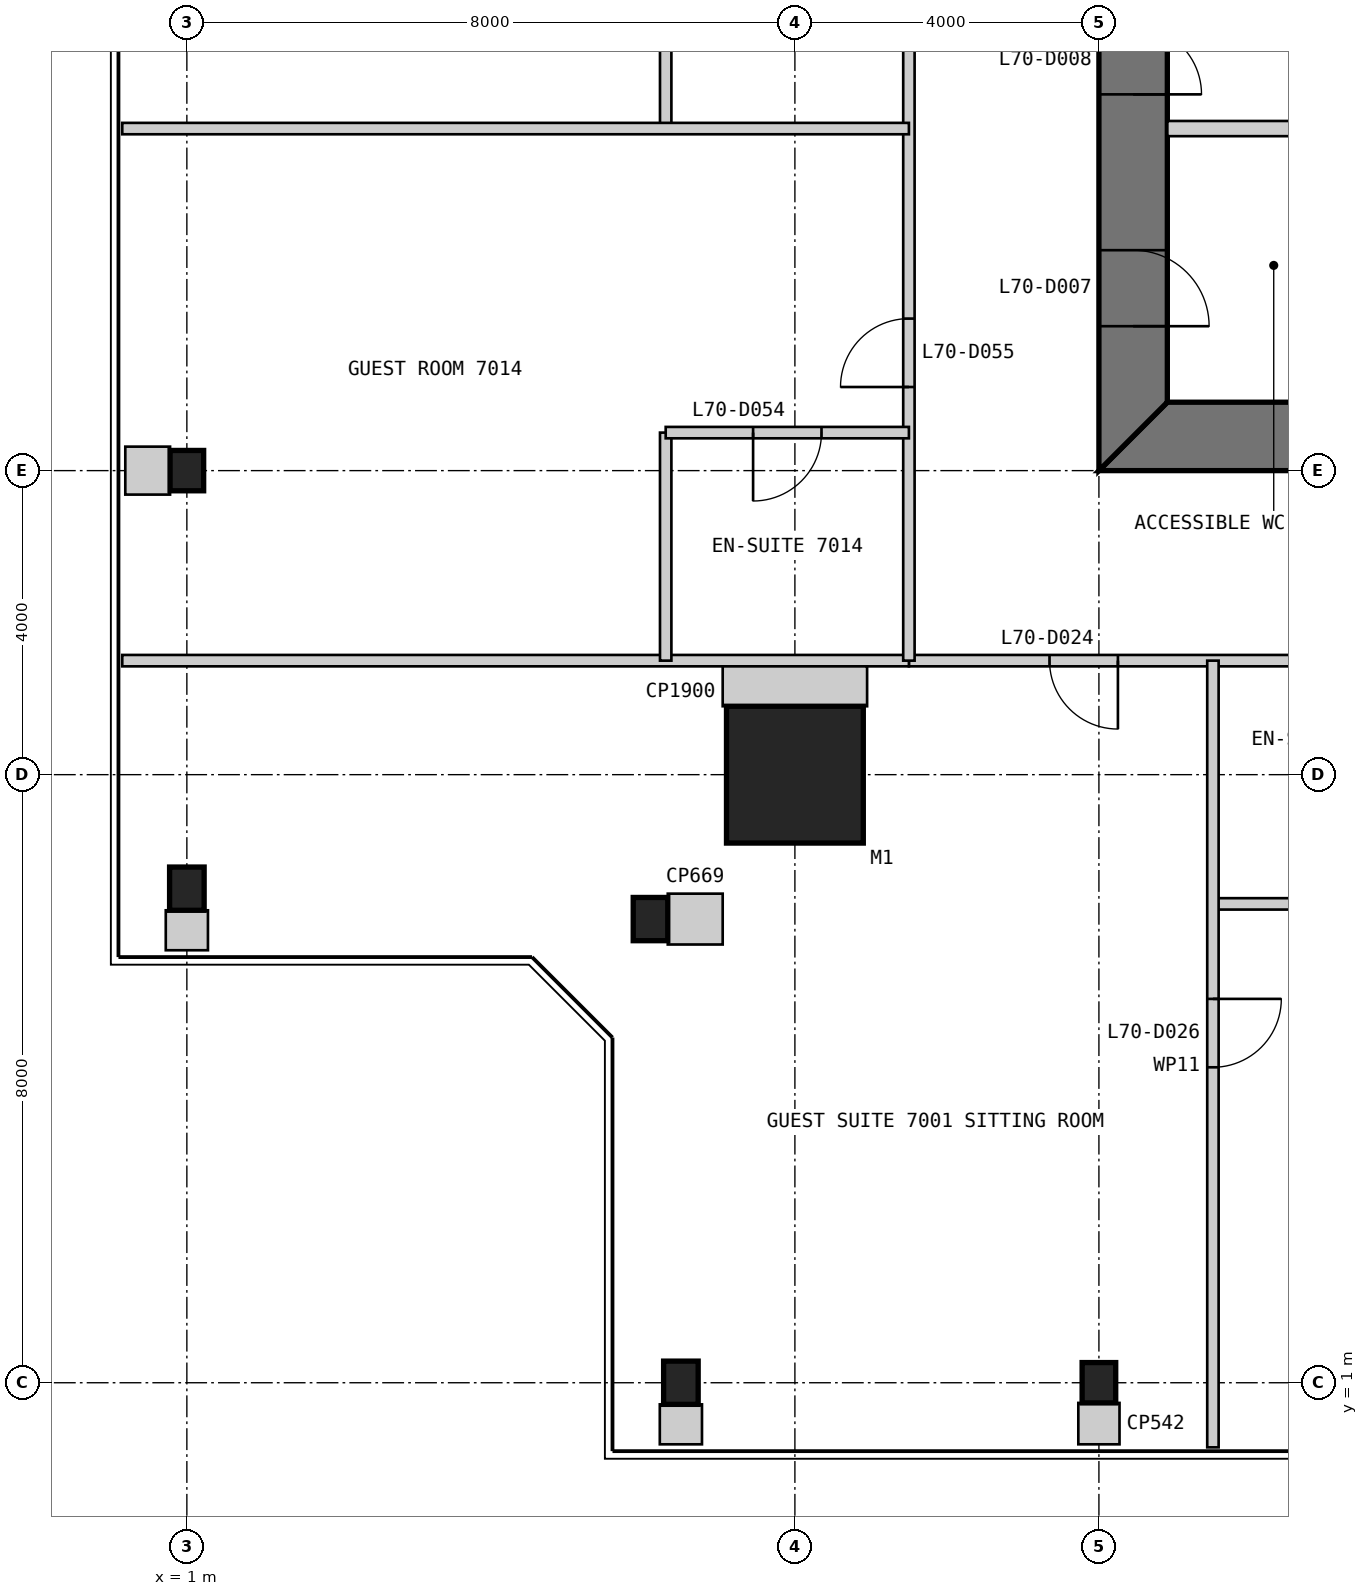
"""IFC4 building model, lengths in metres.
Left out: names, types, materials, properties, quantities, classifications, styles, units other than length and angle.
Written with IfcOpenShell. Run it as: python <this file> out.ifc"""

import sys

from ifc_helpers import new_model, si_unit, direction, frame, frame_2d, origin, origin_2d, place, context, subcontext, project, spatial, polyline, rectangle, i_section, outline, extrude, element, fill, save


model = new_model("IFC4")
c1 = context("Model", 3, precision=1e-05, world=origin(), true_north=direction((0.0, 1.0)))
c2 = subcontext(c1, "Body", "Model", "MODEL_VIEW")
j1 = project(units=[si_unit("LENGTHUNIT", "METRE"), si_unit("PLANEANGLEUNIT", "RADIAN")], contexts=[c1])
p1 = place(None, origin())
s1 = spatial("IfcSite", under=j1, at=p1, CompositionType="ELEMENT")
p2 = place(p1, origin())
s2 = spatial("IfcBuilding", under=s1, at=p2, CompositionType="ELEMENT")
p3 = place(p2, frame((0.0, 0.0, 290.0)))
s3 = spatial("IfcBuildingStorey", under=s2, at=p3, CompositionType="ELEMENT", Elevation=290.0)
p4 = place(p3, frame((9.0, 9.0, 0.0), z_axis=(0.0, 0.0, 1.0), x_axis=(1.0, 0.0, 0.0)))
e1 = element("IfcColumn", 1, at=p4, inside=s3, PredefinedType="COLUMN", context=c2, shape_type="SweptSolid", body=[
    extrude(rectangle(XDim=1.8, YDim=1.8, at=origin_2d()), origin(), (0.0, 0.0, 1.0), 3.4),
])
p5 = place(p3, frame((7.5, 1.0, 0.0), z_axis=(0.0, 0.0, 1.0), x_axis=(1.0, 0.0, 0.0)))
e2 = element("IfcColumn", 2, at=p5, inside=s3, PredefinedType="COLUMN", context=c2, shape_type="SweptSolid", body=[
    extrude(i_section(OverallWidth=0.455, OverallDepth=0.569, WebThickness=0.078, FlangeThickness=0.125, at=origin_2d()), origin(), (0.0, 0.0, 1.0), 3.4),
])
for number, where, z_axis, x_axis in (
    (3, (13.0, 1.0, 0.0), (0.0, 0.0, 1.0), (1.0, 0.0, 0.0)),
    (4, (1.0, 13.0, 0.0), (0.0, 0.0, 1.0), (1.0, 0.0, 0.0)),
):
    element("IfcColumn", number, at=place(p3, frame(where, z_axis=z_axis, x_axis=x_axis)), inside=s3, PredefinedType="COLUMN", context=c2, shape_type="SweptSolid", body=[
        extrude(i_section(OverallWidth=0.442, OverallDepth=0.531, WebThickness=0.066, FlangeThickness=0.106, at=origin_2d()), origin(), (0.0, 0.0, 1.0), 3.4),
    ])
for number, where, z_axis, x_axis in (
    (5, (1.0, 7.5, 0.0), (0.0, 0.0, 1.0), (1.0, 0.0, 0.0)),
    (6, (7.1, 7.1, 0.0), (0.0, 0.0, 1.0), (1.0, 0.0, 0.0)),
):
    element("IfcColumn", number, at=place(p3, frame(where, z_axis=z_axis, x_axis=x_axis)), inside=s3, PredefinedType="COLUMN", context=c2, shape_type="SweptSolid", body=[
        extrude(i_section(OverallWidth=0.455, OverallDepth=0.569, WebThickness=0.078, FlangeThickness=0.125, at=origin_2d()), origin(), (0.0, 0.0, 1.0), 3.4),
    ])
p6 = place(p3, frame((13.0, 13.45, 0.0), z_axis=(0.0, 0.0, 1.0), x_axis=(1.0, 0.0, 0.0)))
e7 = element("IfcWall", 7, at=p6, inside=s3, PredefinedType="SHEAR", context=c2, shape_type="SweptSolid", body=[
    extrude(outline(polyline([(0.0, -0.45), (24.0, -0.45), (23.1, 0.45), (0.9, 0.45), (0.0, -0.45)])), origin(), (0.0, 0.0, 1.0), 3.4),
])
p7 = place(p6, frame((4.9, 0.0, 0.0)))
e8 = element("IfcOpeningElement", 8, at=p7, cuts=e7, PredefinedType="OPENING", context=c2, shape_type="SweptSolid", body=[
    extrude(rectangle(XDim=1.0, YDim=2.2, at=frame_2d((0.5, 1.1))), frame((0.0, 0.46, 0.0), z_axis=(0.0, -1.0, 0.0), x_axis=(1.0, 0.0, 0.0)), (0.0, 0.0, 1.0), 0.92),
])
p8 = place(p6, frame((8.9, 0.0, 0.0)))
e9 = element("IfcOpeningElement", 9, at=p8, cuts=e7, PredefinedType="OPENING", context=c2, shape_type="SweptSolid", body=[
    extrude(rectangle(XDim=1.1, YDim=2.2, at=frame_2d((0.55, 1.1))), frame((0.0, 0.46, 0.0), z_axis=(0.0, -1.0, 0.0), x_axis=(1.0, 0.0, 0.0)), (0.0, 0.0, 1.0), 0.92),
])
p9 = place(p6, frame((15.05, 0.0, 0.0)))
e10 = element("IfcOpeningElement", 10, at=p9, cuts=e7, PredefinedType="OPENING", context=c2, shape_type="SweptSolid", body=[
    extrude(rectangle(XDim=0.9, YDim=2.2, at=frame_2d((0.45, 1.1))), frame((0.0, 0.46, 0.0), z_axis=(0.0, -1.0, 0.0), x_axis=(1.0, 0.0, 0.0)), (0.0, 0.0, 1.0), 0.92),
])
p10 = place(p6, frame((17.9, 0.0, 0.0)))
e11 = element("IfcOpeningElement", 11, at=p10, cuts=e7, PredefinedType="OPENING", context=c2, shape_type="SweptSolid", body=[
    extrude(rectangle(XDim=1.0, YDim=2.2, at=frame_2d((0.5, 1.1))), frame((0.0, 0.46, 0.0), z_axis=(0.0, -1.0, 0.0), x_axis=(1.0, 0.0, 0.0)), (0.0, 0.0, 1.0), 0.92),
])
p11 = place(p6, frame((21.4, 0.0, 0.0)))
e12 = element("IfcOpeningElement", 12, at=p11, cuts=e7, PredefinedType="OPENING", context=c2, shape_type="SweptSolid", body=[
    extrude(rectangle(XDim=1.0, YDim=2.2, at=frame_2d((0.5, 1.1))), frame((0.0, 0.46, 0.0), z_axis=(0.0, -1.0, 0.0), x_axis=(1.0, 0.0, 0.0)), (0.0, 0.0, 1.0), 0.92),
])
p12 = place(p3, frame((13.45, 36.1, 0.0), z_axis=(0.0, 0.0, 1.0), x_axis=(0.0, -1.0, 0.0)))
e13 = element("IfcWall", 13, at=p12, inside=s3, PredefinedType="SHEAR", context=c2, shape_type="SweptSolid", body=[
    extrude(outline(polyline([(-0.9, -0.45), (23.1, -0.45), (22.2, 0.45), (0.0, 0.45), (-0.9, -0.45)])), origin(), (0.0, 0.0, 1.0), 3.4),
])
p13 = place(p12, frame((20.2, 0.0, 0.0)))
e14 = element("IfcOpeningElement", 14, at=p13, cuts=e13, PredefinedType="OPENING", context=c2, shape_type="SweptSolid", body=[
    extrude(rectangle(XDim=1.0, YDim=2.2, at=frame_2d((0.5, 1.1))), frame((0.0, 0.46, 0.0), z_axis=(0.0, -1.0, 0.0), x_axis=(1.0, 0.0, 0.0)), (0.0, 0.0, 1.0), 0.92),
])
p14 = place(p12, frame((17.25, 0.0, 0.0)))
e15 = element("IfcOpeningElement", 15, at=p14, cuts=e13, PredefinedType="OPENING", context=c2, shape_type="SweptSolid", body=[
    extrude(rectangle(XDim=0.9, YDim=2.2, at=frame_2d((0.45, 1.1))), frame((0.0, 0.46, 0.0), z_axis=(0.0, -1.0, 0.0), x_axis=(1.0, 0.0, 0.0)), (0.0, 0.0, 1.0), 0.92),
])
p15 = place(p3, frame((13.9, 17.5, 0.0), z_axis=(0.0, 0.0, 1.0), x_axis=(1.0, 0.0, 0.0)))
e16 = element("IfcWall", 16, at=p15, inside=s3, PredefinedType="PARTITIONING", context=c2, shape_type="SweptSolid", body=[
    extrude(rectangle(XDim=2.8, YDim=0.2, at=frame_2d((1.4, 0.0))), origin(), (0.0, 0.0, 1.0), 3.2),
])
p16 = place(p3, frame((10.5, 10.5, 0.0), z_axis=(0.0, 0.0, 1.0), x_axis=(1.0, 0.0, 0.0)))
e17 = element("IfcWall", 17, at=p16, inside=s3, PredefinedType="PARTITIONING", context=c2, shape_type="SweptSolid", body=[
    extrude(rectangle(XDim=29.0, YDim=0.15, at=frame_2d((14.5, 0.0))), origin(), (0.0, 0.0, 1.0), 3.25),
])
p17 = place(p16, frame((1.85, 0.0, 0.0)))
e18 = element("IfcOpeningElement", 18, at=p17, cuts=e17, PredefinedType="OPENING", context=c2, shape_type="SweptSolid", body=[
    extrude(rectangle(XDim=0.9, YDim=2.1, at=frame_2d((0.45, 1.05))), frame((0.0, 0.085, 0.0), z_axis=(0.0, -1.0, 0.0), x_axis=(1.0, 0.0, 0.0)), (0.0, 0.0, 1.0), 0.17),
])
p18 = place(p16, frame((11.5, 0.0, 0.0)))
e19 = element("IfcOpeningElement", 19, at=p18, cuts=e17, PredefinedType="OPENING", context=c2, shape_type="SweptSolid", body=[
    extrude(rectangle(XDim=0.9, YDim=2.1, at=frame_2d((0.45, 1.05))), frame((0.0, 0.085, 0.0), z_axis=(0.0, -1.0, 0.0), x_axis=(1.0, 0.0, 0.0)), (0.0, 0.0, 1.0), 0.17),
])
p19 = place(p16, frame((24.1, 0.0, 0.0)))
e20 = element("IfcOpeningElement", 20, at=p19, cuts=e17, PredefinedType="OPENING", context=c2, shape_type="SweptSolid", body=[
    extrude(rectangle(XDim=0.9, YDim=2.1, at=frame_2d((0.45, 1.05))), frame((0.0, 0.085, 0.0), z_axis=(0.0, -1.0, 0.0), x_axis=(1.0, 0.0, 0.0)), (0.0, 0.0, 1.0), 0.17),
])
p20 = place(p3, frame((0.15, 10.5, 0.0), z_axis=(0.0, 0.0, 1.0), x_axis=(1.0, 0.0, 0.0)))
e21 = element("IfcWall", 21, at=p20, inside=s3, PredefinedType="PARTITIONING", context=c2, shape_type="SweptSolid", body=[
    extrude(rectangle(XDim=10.35, YDim=0.15, at=frame_2d((5.175, 0.0))), origin(), (0.0, 0.0, 1.0), 3.25),
])
p21 = place(p3, frame((14.5, 7.3, 0.0), z_axis=(0.0, 0.0, 1.0), x_axis=(1.0, 0.0, 0.0)))
e22 = element("IfcWall", 22, at=p21, inside=s3, PredefinedType="PARTITIONING", context=c2, shape_type="SweptSolid", body=[
    extrude(rectangle(XDim=3.0, YDim=0.15, at=frame_2d((1.5, 0.0))), origin(), (0.0, 0.0, 1.0), 3.25),
])
p22 = place(p3, frame((14.5, 0.15, 0.0), z_axis=(0.0, 0.0, 1.0), x_axis=(0.0, 1.0, 0.0)))
e23 = element("IfcWall", 23, at=p22, inside=s3, PredefinedType="PARTITIONING", context=c2, shape_type="SweptSolid", body=[
    extrude(rectangle(XDim=10.35, YDim=0.15, at=frame_2d((5.175, 0.0))), origin(), (0.0, 0.0, 1.0), 3.25),
])
p23 = place(p22, frame((5.0, 0.0, 0.0)))
e24 = element("IfcOpeningElement", 24, at=p23, cuts=e23, PredefinedType="OPENING", context=c2, shape_type="SweptSolid", body=[
    extrude(rectangle(XDim=0.9, YDim=2.1, at=frame_2d((0.45, 1.05))), frame((0.0, 0.085, 0.0), z_axis=(0.0, -1.0, 0.0), x_axis=(1.0, 0.0, 0.0)), (0.0, 0.0, 1.0), 0.17),
])
p24 = place(p3, frame((10.5, 39.5, 0.0), z_axis=(0.0, 0.0, 1.0), x_axis=(0.0, -1.0, 0.0)))
e25 = element("IfcWall", 25, at=p24, inside=s3, PredefinedType="PARTITIONING", context=c2, shape_type="SweptSolid", body=[
    extrude(rectangle(XDim=29.0, YDim=0.15, at=frame_2d((14.5, 0.0))), origin(), (0.0, 0.0, 1.0), 3.25),
])
p25 = place(p24, frame((2.775, 0.0, 0.0)))
e26 = element("IfcOpeningElement", 26, at=p25, cuts=e25, PredefinedType="OPENING", context=c2, shape_type="SweptSolid", body=[
    extrude(rectangle(XDim=0.9, YDim=2.1, at=frame_2d((0.45, 1.05))), frame((0.0, 0.085, 0.0), z_axis=(0.0, -1.0, 0.0), x_axis=(1.0, 0.0, 0.0)), (0.0, 0.0, 1.0), 0.17),
])
p26 = place(p24, frame((11.1, 0.0, 0.0)))
e27 = element("IfcOpeningElement", 27, at=p26, cuts=e25, PredefinedType="OPENING", context=c2, shape_type="SweptSolid", body=[
    extrude(rectangle(XDim=0.9, YDim=2.1, at=frame_2d((0.45, 1.05))), frame((0.0, 0.085, 0.0), z_axis=(0.0, -1.0, 0.0), x_axis=(1.0, 0.0, 0.0)), (0.0, 0.0, 1.0), 0.17),
])
p27 = place(p24, frame((17.5, 0.0, 0.0)))
e28 = element("IfcOpeningElement", 28, at=p27, cuts=e25, PredefinedType="OPENING", context=c2, shape_type="SweptSolid", body=[
    extrude(rectangle(XDim=0.9, YDim=2.1, at=frame_2d((0.45, 1.05))), frame((0.0, 0.085, 0.0), z_axis=(0.0, -1.0, 0.0), x_axis=(1.0, 0.0, 0.0)), (0.0, 0.0, 1.0), 0.17),
])
p28 = place(p24, frame((24.5, 0.0, 0.0)))
e29 = element("IfcOpeningElement", 29, at=p28, cuts=e25, PredefinedType="OPENING", context=c2, shape_type="SweptSolid", body=[
    extrude(rectangle(XDim=0.9, YDim=2.1, at=frame_2d((0.45, 1.05))), frame((0.0, 0.085, 0.0), z_axis=(0.0, -1.0, 0.0), x_axis=(1.0, 0.0, 0.0)), (0.0, 0.0, 1.0), 0.17),
])
p29 = place(p3, frame((7.3, 20.5, 0.0), z_axis=(0.0, 0.0, 1.0), x_axis=(0.0, -1.0, 0.0)))
e30 = element("IfcWall", 30, at=p29, inside=s3, PredefinedType="PARTITIONING", context=c2, shape_type="SweptSolid", body=[
    extrude(rectangle(XDim=3.0, YDim=0.15, at=frame_2d((1.5, 0.0))), origin(), (0.0, 0.0, 1.0), 3.25),
])
p30 = place(p3, frame((0.15, 17.5, 0.0), z_axis=(0.0, 0.0, 1.0), x_axis=(1.0, 0.0, 0.0)))
e31 = element("IfcWall", 31, at=p30, inside=s3, PredefinedType="PARTITIONING", context=c2, shape_type="SweptSolid", body=[
    extrude(rectangle(XDim=10.35, YDim=0.15, at=frame_2d((5.175, 0.0))), origin(), (0.0, 0.0, 1.0), 3.25),
])
p31 = place(p3, frame((7.3, 13.5, 0.0), z_axis=(0.0, 0.0, 1.0), x_axis=(0.0, -1.0, 0.0)))
e32 = element("IfcWall", 32, at=p31, inside=s3, PredefinedType="PARTITIONING", context=c2, shape_type="SweptSolid", body=[
    extrude(rectangle(XDim=3.0, YDim=0.15, at=frame_2d((1.5, 0.0))), origin(), (0.0, 0.0, 1.0), 3.25),
])
p32 = place(p3, frame((7.3, 13.5, 0.0), z_axis=(0.0, 0.0, 1.0), x_axis=(1.0, 0.0, 0.0)))
e33 = element("IfcWall", 33, at=p32, inside=s3, PredefinedType="PARTITIONING", context=c2, shape_type="SweptSolid", body=[
    extrude(rectangle(XDim=3.2, YDim=0.15, at=frame_2d((1.6, 0.0))), origin(), (0.0, 0.0, 1.0), 3.25),
])
p33 = place(p32, frame((1.15, 0.0, 0.0)))
e34 = element("IfcOpeningElement", 34, at=p33, cuts=e33, PredefinedType="OPENING", context=c2, shape_type="SweptSolid", body=[
    extrude(rectangle(XDim=0.9, YDim=2.1, at=frame_2d((0.45, 1.05))), frame((0.0, 0.085, 0.0), z_axis=(0.0, -1.0, 0.0), x_axis=(1.0, 0.0, 0.0)), (0.0, 0.0, 1.0), 0.17),
])
p34 = place(p3, frame((9.0, 10.425, 0.0), z_axis=(0.0, 0.0, 1.0), x_axis=(0.0, -1.0, 0.0)))
e35 = element("IfcWall", 35, at=p34, inside=s3, PredefinedType="PARTITIONING", context=c2, shape_type="SweptSolid", body=[
    extrude(rectangle(XDim=0.525, YDim=1.9, at=frame_2d((0.263, 0.0))), origin(), (0.0, 0.0, 1.0), 3.25),
])
p35 = place(p3, frame((7.5, 0.19, 0.0), z_axis=(0.0, 0.0, 1.0), x_axis=(0.0, 1.0, 0.0)))
e36 = element("IfcWall", 36, at=p35, inside=s3, PredefinedType="PARTITIONING", context=c2, shape_type="SweptSolid", body=[
    extrude(rectangle(XDim=0.526, YDim=0.555, at=frame_2d((0.263, 0.0))), origin(), (0.0, 0.0, 1.0), 3.25),
])
p36 = place(p3, frame((13.0, 0.19, 0.0), z_axis=(0.0, 0.0, 1.0), x_axis=(0.0, 1.0, 0.0)))
e37 = element("IfcWall", 37, at=p36, inside=s3, PredefinedType="PARTITIONING", context=c2, shape_type="SweptSolid", body=[
    extrude(rectangle(XDim=0.545, YDim=0.542, at=frame_2d((0.272, 0.0))), origin(), (0.0, 0.0, 1.0), 3.25),
])
p37 = place(p3, frame((1.0, 6.69, 0.0), z_axis=(0.0, 0.0, 1.0), x_axis=(0.0, 1.0, 0.0)))
e38 = element("IfcWall", 38, at=p37, inside=s3, PredefinedType="PARTITIONING", context=c2, shape_type="SweptSolid", body=[
    extrude(rectangle(XDim=0.526, YDim=0.555, at=frame_2d((0.263, 0.0))), origin(), (0.0, 0.0, 1.0), 3.25),
])
p38 = place(p3, frame((8.05, 7.1, 0.0), z_axis=(0.0, 0.0, 1.0), x_axis=(-1.0, 0.0, 0.0)))
e39 = element("IfcWall", 39, at=p38, inside=s3, PredefinedType="PARTITIONING", context=c2, shape_type="SweptSolid", body=[
    extrude(rectangle(XDim=0.723, YDim=0.669, at=frame_2d((0.361, 0.0))), origin(), (0.0, 0.0, 1.0), 3.25),
])
p39 = place(p3, frame((0.19, 13.0, 0.0), z_axis=(0.0, 0.0, 1.0), x_axis=(1.0, 0.0, 0.0)))
e40 = element("IfcWall", 40, at=p39, inside=s3, PredefinedType="PARTITIONING", context=c2, shape_type="SweptSolid", body=[
    extrude(rectangle(XDim=0.589, YDim=0.631, at=frame_2d((0.294, 0.0))), origin(), (0.0, 0.0, 1.0), 3.25),
])
p40 = place(p13, origin())
e41 = element("IfcDoor", 41, at=p40, inside=s3, OperationType="SINGLE_SWING_RIGHT", PredefinedType="DOOR", context=c2, shape_type="SweptSolid", body=[
    extrude(rectangle(XDim=1.0, YDim=2.2, at=frame_2d((0.5, 1.1))), frame((0.0, 0.025, 0.0), z_axis=(0.0, -1.0, 0.0), x_axis=(1.0, 0.0, 0.0)), (0.0, 0.0, 1.0), 0.05),
    extrude(outline(polyline([(0.0, 0.0), (0.04, 0.0), (0.04, 2.16), (0.96, 2.16), (0.96, 0.0), (1.0, 0.0), (1.0, 2.2), (0.0, 2.2), (0.0, 0.0)])), frame((0.0, 0.3, 0.0), z_axis=(0.0, -1.0, 0.0), x_axis=(1.0, 0.0, 0.0)), (0.0, 0.0, 1.0), 0.6),
])
fill(e14, e41)
p41 = place(p14, origin())
e42 = element("IfcDoor", 42, at=p41, inside=s3, OperationType="SINGLE_SWING_RIGHT", PredefinedType="DOOR", context=c2, shape_type="SweptSolid", body=[
    extrude(rectangle(XDim=0.9, YDim=2.2, at=frame_2d((0.45, 1.1))), frame((0.0, 0.025, 0.0), z_axis=(0.0, -1.0, 0.0), x_axis=(1.0, 0.0, 0.0)), (0.0, 0.0, 1.0), 0.05),
    extrude(outline(polyline([(0.0, 0.0), (0.04, 0.0), (0.04, 2.16), (0.86, 2.16), (0.86, 0.0), (0.9, 0.0), (0.9, 2.2), (0.0, 2.2), (0.0, 0.0)])), frame((0.0, 0.3, 0.0), z_axis=(0.0, -1.0, 0.0), x_axis=(1.0, 0.0, 0.0)), (0.0, 0.0, 1.0), 0.6),
])
fill(e15, e42)
p42 = place(p17, frame((0.9, 0.0, 0.0), z_axis=(0.0, 0.0, 1.0), x_axis=(-1.0, 0.0, 0.0)))
e43 = element("IfcDoor", 43, at=p42, inside=s3, OperationType="SINGLE_SWING_LEFT", PredefinedType="DOOR", context=c2, shape_type="SweptSolid", body=[
    extrude(rectangle(XDim=0.9, YDim=2.1, at=frame_2d((0.45, 1.05))), frame((0.0, 0.025, 0.0), z_axis=(0.0, -1.0, 0.0), x_axis=(1.0, 0.0, 0.0)), (0.0, 0.0, 1.0), 0.05),
])
fill(e18, e43)
p43 = place(p23, frame((0.9, 0.0, 0.0), z_axis=(0.0, 0.0, 1.0), x_axis=(-1.0, 0.0, 0.0)))
e44 = element("IfcDoor", 44, at=p43, inside=s3, OperationType="SINGLE_SWING_LEFT", PredefinedType="DOOR", context=c2, shape_type="SweptSolid", body=[
    extrude(rectangle(XDim=0.9, YDim=2.1, at=frame_2d((0.45, 1.05))), frame((0.0, 0.025, 0.0), z_axis=(0.0, -1.0, 0.0), x_axis=(1.0, 0.0, 0.0)), (0.0, 0.0, 1.0), 0.05),
])
fill(e24, e44)
p44 = place(p33, frame((0.9, 0.0, 0.0), z_axis=(0.0, 0.0, 1.0), x_axis=(-1.0, 0.0, 0.0)))
e45 = element("IfcDoor", 45, at=p44, inside=s3, OperationType="SINGLE_SWING_RIGHT", PredefinedType="DOOR", context=c2, shape_type="SweptSolid", body=[
    extrude(rectangle(XDim=0.9, YDim=2.1, at=frame_2d((0.45, 1.05))), frame((0.0, 0.025, 0.0), z_axis=(0.0, -1.0, 0.0), x_axis=(1.0, 0.0, 0.0)), (0.0, 0.0, 1.0), 0.05),
])
fill(e34, e45)
p45 = place(p28, frame((0.9, 0.0, 0.0), z_axis=(0.0, 0.0, 1.0), x_axis=(-1.0, 0.0, 0.0)))
e46 = element("IfcDoor", 46, at=p45, inside=s3, OperationType="SINGLE_SWING_LEFT", PredefinedType="DOOR", context=c2, shape_type="SweptSolid", body=[
    extrude(rectangle(XDim=0.9, YDim=2.1, at=frame_2d((0.45, 1.05))), frame((0.0, 0.025, 0.0), z_axis=(0.0, -1.0, 0.0), x_axis=(1.0, 0.0, 0.0)), (0.0, 0.0, 1.0), 0.05),
])
fill(e29, e46)
save(model, sys.argv[1])
